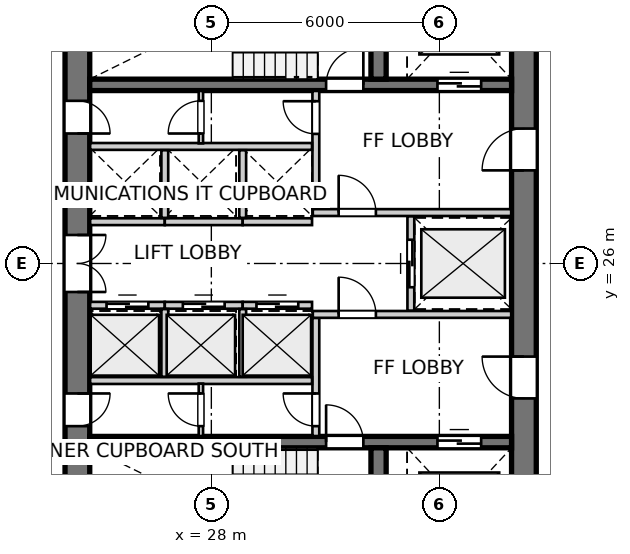
"""IFC4 building model, lengths in metres.
Left out: names, types, materials, properties, quantities, classifications, styles, units other than length and angle.
Written with IfcOpenShell. Run it as: python <this file> out.ifc"""

import sys

from ifc_helpers import new_model, si_unit, direction, frame, frame_2d, origin, place, context, subcontext, project, spatial, rectangle, extrude, source, transform, mapped, element, fill, save


model = new_model("IFC4")
c1 = context("Model", 3, precision=1e-05, world=origin(), true_north=direction((0.0, 1.0)))
c2 = subcontext(c1, "Body", "Model", "MODEL_VIEW")
j1 = project(units=[si_unit("LENGTHUNIT", "METRE"), si_unit("PLANEANGLEUNIT", "RADIAN")], contexts=[c1])
p1 = place(None, origin())
s1 = spatial("IfcSite", under=j1, at=p1, CompositionType="ELEMENT")
p2 = place(p1, origin())
s2 = spatial("IfcBuilding", under=s1, at=p2, CompositionType="ELEMENT")
p3 = place(p2, frame((0.0, 0.0, 86.4)))
s3 = spatial("IfcBuildingStorey", under=s2, at=p3, CompositionType="ELEMENT", Elevation=86.4)
p4 = place(p3, frame((24.475, 33.8, 0.0), z_axis=(0.0, 0.0, 1.0), x_axis=(0.0, -1.0, 0.0)))
e1 = element("IfcWall", 1, at=p4, inside=s3, PredefinedType="SHEAR", context=c2, shape_type="SweptSolid", body=[
    extrude(rectangle(XDim=15.6, YDim=0.65, at=frame_2d((7.8, 0.0))), origin(), (0.0, 0.0, 1.0), 2.95),
])
p5 = place(p4, frame((7.05, 0.0, 0.0)))
e2 = element("IfcOpeningElement", 2, at=p5, cuts=e1, PredefinedType="OPENING", context=c2, shape_type="SweptSolid", body=[
    extrude(rectangle(XDim=1.5, YDim=2.15, at=frame_2d((0.75, 1.075))), frame((0.0, 0.335, 0.0), z_axis=(0.0, -1.0, 0.0), x_axis=(1.0, 0.0, 0.0)), (0.0, 0.0, 1.0), 0.67),
])
p6 = place(p4, frame((3.52, 0.0, 0.0)))
e3 = element("IfcOpeningElement", 3, at=p6, cuts=e1, PredefinedType="OPENING", context=c2, shape_type="SweptSolid", body=[
    extrude(rectangle(XDim=0.86, YDim=2.05, at=frame_2d((0.43, 1.025))), frame((0.0, 0.335, 0.0), z_axis=(0.0, -1.0, 0.0), x_axis=(1.0, 0.0, 0.0)), (0.0, 0.0, 1.0), 0.67),
])
p7 = place(p4, frame((11.22, 0.0, 0.0)))
e4 = element("IfcOpeningElement", 4, at=p7, cuts=e1, PredefinedType="OPENING", context=c2, shape_type="SweptSolid", body=[
    extrude(rectangle(XDim=0.86, YDim=2.05, at=frame_2d((0.43, 1.025))), frame((0.0, 0.335, 0.0), z_axis=(0.0, -1.0, 0.0), x_axis=(1.0, 0.0, 0.0)), (0.0, 0.0, 1.0), 0.67),
])
p8 = place(p3, frame((36.225, 18.2, 0.0), z_axis=(0.0, 0.0, 1.0), x_axis=(0.0, 1.0, 0.0)))
e5 = element("IfcWall", 5, at=p8, inside=s3, PredefinedType="SHEAR", context=c2, shape_type="SweptSolid", body=[
    extrude(rectangle(XDim=15.6, YDim=0.65, at=frame_2d((7.8, 0.0))), origin(), (0.0, 0.0, 1.0), 2.95),
])
p9 = place(p8, frame((4.25, 0.0, 0.0)))
e6 = element("IfcOpeningElement", 6, at=p9, cuts=e5, PredefinedType="OPENING", context=c2, shape_type="SweptSolid", body=[
    extrude(rectangle(XDim=1.1, YDim=2.15, at=frame_2d((0.55, 1.075))), frame((0.0, 0.335, 0.0), z_axis=(0.0, -1.0, 0.0), x_axis=(1.0, 0.0, 0.0)), (0.0, 0.0, 1.0), 0.67),
])
p10 = place(p8, frame((10.25, 0.0, 0.0)))
e7 = element("IfcOpeningElement", 7, at=p10, cuts=e5, PredefinedType="OPENING", context=c2, shape_type="SweptSolid", body=[
    extrude(rectangle(XDim=1.1, YDim=2.15, at=frame_2d((0.55, 1.075))), frame((0.0, 0.335, 0.0), z_axis=(0.0, -1.0, 0.0), x_axis=(1.0, 0.0, 0.0)), (0.0, 0.0, 1.0), 0.67),
])
p11 = place(p3, frame((24.8, 21.3, 0.0), z_axis=(0.0, 0.0, 1.0), x_axis=(1.0, 0.0, 0.0)))
e8 = element("IfcWall", 8, at=p11, inside=s3, PredefinedType="SHEAR", context=c2, shape_type="SweptSolid", body=[
    extrude(rectangle(XDim=11.1, YDim=0.3, at=frame_2d((5.55, 0.0))), origin(), (0.0, 0.0, 1.0), 2.95),
])
p12 = place(p11, frame((6.22, 0.0, 0.0)))
e9 = element("IfcOpeningElement", 9, at=p12, cuts=e8, PredefinedType="OPENING", context=c2, shape_type="SweptSolid", body=[
    extrude(rectangle(XDim=0.98, YDim=2.15, at=frame_2d((0.49, 1.075))), frame((0.0, 0.16, 0.0), z_axis=(0.0, -1.0, 0.0), x_axis=(1.0, 0.0, 0.0)), (0.0, 0.0, 1.0), 0.32),
])
p13 = place(p11, frame((9.15, 0.0, 0.0)))
e10 = element("IfcOpeningElement", 10, at=p13, cuts=e8, PredefinedType="OPENING", context=c2, shape_type="SweptSolid", body=[
    extrude(rectangle(XDim=1.15, YDim=2.15, at=frame_2d((0.575, 1.075))), frame((0.0, 0.16, 0.0), z_axis=(0.0, -1.0, 0.0), x_axis=(1.0, 0.0, 0.0)), (0.0, 0.0, 1.0), 0.32),
])
p14 = place(p3, frame((32.4, 18.2, 0.0), z_axis=(0.0, 0.0, 1.0), x_axis=(0.0, 1.0, 0.0)))
e11 = element("IfcWall", 11, at=p14, inside=s3, PredefinedType="SHEAR", context=c2, shape_type="SweptSolid", body=[
    extrude(rectangle(XDim=2.95, YDim=0.4, at=frame_2d((1.475, 0.0))), origin(), (0.0, 0.0, 1.0), 2.95),
])
p15 = place(p3, frame((24.8, 30.7, 0.0), z_axis=(0.0, 0.0, 1.0), x_axis=(1.0, 0.0, 0.0)))
e12 = element("IfcWall", 12, at=p15, inside=s3, PredefinedType="SHEAR", context=c2, shape_type="SweptSolid", body=[
    extrude(rectangle(XDim=11.1, YDim=0.3, at=frame_2d((5.55, 0.0))), origin(), (0.0, 0.0, 1.0), 2.95),
])
p16 = place(p15, frame((6.22, 0.0, 0.0)))
e13 = element("IfcOpeningElement", 13, at=p16, cuts=e12, PredefinedType="OPENING", context=c2, shape_type="SweptSolid", body=[
    extrude(rectangle(XDim=0.98, YDim=2.15, at=frame_2d((0.49, 1.075))), frame((0.0, 0.16, 0.0), z_axis=(0.0, -1.0, 0.0), x_axis=(1.0, 0.0, 0.0)), (0.0, 0.0, 1.0), 0.32),
])
p17 = place(p15, frame((9.15, 0.0, 0.0)))
e14 = element("IfcOpeningElement", 14, at=p17, cuts=e12, PredefinedType="OPENING", context=c2, shape_type="SweptSolid", body=[
    extrude(rectangle(XDim=1.15, YDim=2.15, at=frame_2d((0.575, 1.075))), frame((0.0, 0.16, 0.0), z_axis=(0.0, -1.0, 0.0), x_axis=(1.0, 0.0, 0.0)), (0.0, 0.0, 1.0), 0.32),
])
p18 = place(p3, frame((32.4, 30.85, 0.0), z_axis=(0.0, 0.0, 1.0), x_axis=(0.0, 1.0, 0.0)))
e15 = element("IfcWall", 15, at=p18, inside=s3, PredefinedType="SHEAR", context=c2, shape_type="SweptSolid", body=[
    extrude(rectangle(XDim=2.95, YDim=0.4, at=frame_2d((1.475, 0.0))), origin(), (0.0, 0.0, 1.0), 2.95),
])
p19 = place(p3, frame((30.75, 21.46, 0.0), z_axis=(0.0, 0.0, 1.0), x_axis=(0.0, 1.0, 0.0)))
e16 = element("IfcWall", 16, at=p19, inside=s3, PredefinedType="PARTITIONING", context=c2, shape_type="SweptSolid", body=[
    extrude(rectangle(XDim=3.11, YDim=0.18, at=frame_2d((1.555, 0.0))), origin(), (0.0, 0.0, 1.0), 2.95),
])
p20 = place(p19, frame((0.26, 0.0, 0.0)))
e17 = element("IfcOpeningElement", 17, at=p20, cuts=e16, PredefinedType="OPENING", context=c2, shape_type="SweptSolid", body=[
    extrude(rectangle(XDim=0.86, YDim=2.05, at=frame_2d((0.43, 1.025))), frame((0.0, 0.1, 0.0), z_axis=(0.0, -1.0, 0.0), x_axis=(1.0, 0.0, 0.0)), (0.0, 0.0, 1.0), 0.2),
])
p21 = place(p3, frame((30.67, 24.66, 0.0), z_axis=(0.0, 0.0, 1.0), x_axis=(1.0, 0.0, 0.0)))
e18 = element("IfcWall", 18, at=p21, inside=s3, PredefinedType="PARTITIONING", context=c2, shape_type="SweptSolid", body=[
    extrude(rectangle(XDim=5.22, YDim=0.18, at=frame_2d((2.61, 0.0))), origin(), (0.0, 0.0, 1.0), 2.95),
])
p22 = place(p21, frame((0.68, 0.0, 0.0)))
e19 = element("IfcOpeningElement", 19, at=p22, cuts=e18, PredefinedType="OPENING", context=c2, shape_type="SweptSolid", body=[
    extrude(rectangle(XDim=0.98, YDim=2.15, at=frame_2d((0.49, 1.075))), frame((0.0, 0.1, 0.0), z_axis=(0.0, -1.0, 0.0), x_axis=(1.0, 0.0, 0.0)), (0.0, 0.0, 1.0), 0.2),
])
p23 = place(p3, frame((30.75, 27.43, 0.0), z_axis=(0.0, 0.0, 1.0), x_axis=(0.0, 1.0, 0.0)))
e20 = element("IfcWall", 20, at=p23, inside=s3, PredefinedType="PARTITIONING", context=c2, shape_type="SweptSolid", body=[
    extrude(rectangle(XDim=3.11, YDim=0.18, at=frame_2d((1.555, 0.0))), origin(), (0.0, 0.0, 1.0), 2.95),
])
p24 = place(p23, frame((1.98, 0.0, 0.0)))
e21 = element("IfcOpeningElement", 21, at=p24, cuts=e20, PredefinedType="OPENING", context=c2, shape_type="SweptSolid", body=[
    extrude(rectangle(XDim=0.86, YDim=2.05, at=frame_2d((0.43, 1.025))), frame((0.0, 0.1, 0.0), z_axis=(0.0, -1.0, 0.0), x_axis=(1.0, 0.0, 0.0)), (0.0, 0.0, 1.0), 0.2),
])
p25 = place(p3, frame((30.67, 27.34, 0.0), z_axis=(0.0, 0.0, 1.0), x_axis=(1.0, 0.0, 0.0)))
e22 = element("IfcWall", 22, at=p25, inside=s3, PredefinedType="PARTITIONING", context=c2, shape_type="SweptSolid", body=[
    extrude(rectangle(XDim=5.22, YDim=0.18, at=frame_2d((2.61, 0.0))), origin(), (0.0, 0.0, 1.0), 2.95),
])
p26 = place(p25, frame((0.68, 0.0, 0.0)))
e23 = element("IfcOpeningElement", 23, at=p26, cuts=e22, PredefinedType="OPENING", context=c2, shape_type="SweptSolid", body=[
    extrude(rectangle(XDim=0.98, YDim=2.15, at=frame_2d((0.49, 1.075))), frame((0.0, 0.1, 0.0), z_axis=(0.0, -1.0, 0.0), x_axis=(1.0, 0.0, 0.0)), (0.0, 0.0, 1.0), 0.2),
])
p27 = place(p3, frame((33.25, 24.76, 0.0), z_axis=(0.0, 0.0, 1.0), x_axis=(0.0, 1.0, 0.0)))
e24 = element("IfcWall", 24, at=p27, inside=s3, PredefinedType="PARTITIONING", context=c2, shape_type="SweptSolid", body=[
    extrude(rectangle(XDim=2.48, YDim=0.18, at=frame_2d((1.24, 0.0))), origin(), (0.0, 0.0, 1.0), 2.95),
])
p28 = place(p27, frame((0.615, 0.0, 0.0)))
e25 = element("IfcOpeningElement", 25, at=p28, cuts=e24, PredefinedType="OPENING", context=c2, shape_type="SweptSolid", body=[
    extrude(rectangle(XDim=1.25, YDim=2.15, at=frame_2d((0.625, 1.075))), frame((0.0, 0.1, 0.0), z_axis=(0.0, -1.0, 0.0), x_axis=(1.0, 0.0, 0.0)), (0.0, 0.0, 1.0), 0.2),
])
p29 = place(p3, frame((24.81, 22.92, 0.0), z_axis=(0.0, 0.0, 1.0), x_axis=(1.0, 0.0, 0.0)))
e26 = element("IfcWall", 26, at=p29, inside=s3, PredefinedType="PARTITIONING", context=c2, shape_type="SweptSolid", body=[
    extrude(rectangle(XDim=5.84, YDim=0.18, at=frame_2d((2.92, 0.0))), origin(), (0.0, 0.0, 1.0), 2.95),
])
p30 = place(p3, frame((24.81, 24.9, 0.0), z_axis=(0.0, 0.0, 1.0), x_axis=(1.0, 0.0, 0.0)))
e27 = element("IfcWall", 27, at=p30, inside=s3, PredefinedType="PARTITIONING", context=c2, shape_type="SweptSolid", body=[
    extrude(rectangle(XDim=1.965, YDim=0.18, at=frame_2d((0.982, 0.0))), origin(), (0.0, 0.0, 1.0), 2.95),
])
p31 = place(p30, frame((0.433, 0.0, 0.0)))
e28 = element("IfcOpeningElement", 28, at=p31, cuts=e27, PredefinedType="OPENING", context=c2, shape_type="SweptSolid", body=[
    extrude(rectangle(XDim=1.1, YDim=2.15, at=frame_2d((0.55, 1.075))), frame((0.0, 0.1, 0.0), z_axis=(0.0, -1.0, 0.0), x_axis=(1.0, 0.0, 0.0)), (0.0, 0.0, 1.0), 0.2),
])
p32 = place(p3, frame((26.775, 24.9, 0.0), z_axis=(0.0, 0.0, 1.0), x_axis=(1.0, 0.0, 0.0)))
e29 = element("IfcWall", 29, at=p32, inside=s3, PredefinedType="PARTITIONING", context=c2, shape_type="SweptSolid", body=[
    extrude(rectangle(XDim=2.05, YDim=0.18, at=frame_2d((1.025, 0.0))), origin(), (0.0, 0.0, 1.0), 2.95),
])
p33 = place(p32, frame((0.475, 0.0, 0.0)))
e30 = element("IfcOpeningElement", 30, at=p33, cuts=e29, PredefinedType="OPENING", context=c2, shape_type="SweptSolid", body=[
    extrude(rectangle(XDim=1.1, YDim=2.15, at=frame_2d((0.55, 1.075))), frame((0.0, 0.1, 0.0), z_axis=(0.0, -1.0, 0.0), x_axis=(1.0, 0.0, 0.0)), (0.0, 0.0, 1.0), 0.2),
])
p34 = place(p3, frame((26.775, 23.02, 0.0), z_axis=(0.0, 0.0, 1.0), x_axis=(0.0, 1.0, 0.0)))
e31 = element("IfcWall", 31, at=p34, inside=s3, PredefinedType="PARTITIONING", context=c2, shape_type="SweptSolid", body=[
    extrude(rectangle(XDim=1.78, YDim=0.18, at=frame_2d((0.89, 0.0))), origin(), (0.0, 0.0, 1.0), 2.95),
])
p35 = place(p3, frame((28.825, 24.9, 0.0), z_axis=(0.0, 0.0, 1.0), x_axis=(1.0, 0.0, 0.0)))
e32 = element("IfcWall", 32, at=p35, inside=s3, PredefinedType="PARTITIONING", context=c2, shape_type="SweptSolid", body=[
    extrude(rectangle(XDim=1.825, YDim=0.18, at=frame_2d((0.913, 0.0))), origin(), (0.0, 0.0, 1.0), 2.95),
])
p36 = place(p35, frame((0.363, 0.0, 0.0)))
e33 = element("IfcOpeningElement", 33, at=p36, cuts=e32, PredefinedType="OPENING", context=c2, shape_type="SweptSolid", body=[
    extrude(rectangle(XDim=1.1, YDim=2.15, at=frame_2d((0.55, 1.075))), frame((0.0, 0.1, 0.0), z_axis=(0.0, -1.0, 0.0), x_axis=(1.0, 0.0, 0.0)), (0.0, 0.0, 1.0), 0.2),
])
p37 = place(p3, frame((28.825, 23.02, 0.0), z_axis=(0.0, 0.0, 1.0), x_axis=(0.0, 1.0, 0.0)))
e34 = element("IfcWall", 34, at=p37, inside=s3, PredefinedType="PARTITIONING", context=c2, shape_type="SweptSolid", body=[
    extrude(rectangle(XDim=1.78, YDim=0.18, at=frame_2d((0.89, 0.0))), origin(), (0.0, 0.0, 1.0), 2.95),
])
p38 = place(p3, frame((24.81, 29.08, 0.0), z_axis=(0.0, 0.0, 1.0), x_axis=(1.0, 0.0, 0.0)))
e35 = element("IfcWall", 35, at=p38, inside=s3, PredefinedType="PARTITIONING", context=c2, shape_type="SweptSolid", body=[
    extrude(rectangle(XDim=5.84, YDim=0.18, at=frame_2d((2.92, 0.0))), origin(), (0.0, 0.0, 1.0), 2.95),
])
p39 = place(p3, frame((24.81, 27.1, 0.0), z_axis=(0.0, 0.0, 1.0), x_axis=(1.0, 0.0, 0.0)))
e36 = element("IfcWall", 36, at=p39, inside=s3, PredefinedType="PARTITIONING", context=c2, shape_type="SweptSolid", body=[
    extrude(rectangle(XDim=1.965, YDim=0.18, at=frame_2d((0.982, 0.0))), origin(), (0.0, 0.0, 1.0), 2.95),
])
p40 = place(p3, frame((26.775, 27.1, 0.0), z_axis=(0.0, 0.0, 1.0), x_axis=(1.0, 0.0, 0.0)))
e37 = element("IfcWall", 37, at=p40, inside=s3, PredefinedType="PARTITIONING", context=c2, shape_type="SweptSolid", body=[
    extrude(rectangle(XDim=2.05, YDim=0.18, at=frame_2d((1.025, 0.0))), origin(), (0.0, 0.0, 1.0), 2.95),
])
p41 = place(p3, frame((26.775, 27.2, 0.0), z_axis=(0.0, 0.0, 1.0), x_axis=(0.0, 1.0, 0.0)))
e38 = element("IfcWall", 38, at=p41, inside=s3, PredefinedType="PARTITIONING", context=c2, shape_type="SweptSolid", body=[
    extrude(rectangle(XDim=1.78, YDim=0.18, at=frame_2d((0.89, 0.0))), origin(), (0.0, 0.0, 1.0), 2.95),
])
p42 = place(p3, frame((28.825, 27.1, 0.0), z_axis=(0.0, 0.0, 1.0), x_axis=(1.0, 0.0, 0.0)))
e39 = element("IfcWall", 39, at=p42, inside=s3, PredefinedType="PARTITIONING", context=c2, shape_type="SweptSolid", body=[
    extrude(rectangle(XDim=1.825, YDim=0.18, at=frame_2d((0.913, 0.0))), origin(), (0.0, 0.0, 1.0), 2.95),
])
p43 = place(p3, frame((28.825, 27.2, 0.0), z_axis=(0.0, 0.0, 1.0), x_axis=(0.0, 1.0, 0.0)))
e40 = element("IfcWall", 40, at=p43, inside=s3, PredefinedType="PARTITIONING", context=c2, shape_type="SweptSolid", body=[
    extrude(rectangle(XDim=1.78, YDim=0.18, at=frame_2d((0.89, 0.0))), origin(), (0.0, 0.0, 1.0), 2.95),
])
p44 = place(p3, frame((27.725, 21.46, 0.0), z_axis=(0.0, 0.0, 1.0), x_axis=(0.0, 1.0, 0.0)))
e41 = element("IfcWall", 41, at=p44, inside=s3, PredefinedType="PARTITIONING", context=c2, shape_type="SweptSolid", body=[
    extrude(rectangle(XDim=1.38, YDim=0.115, at=frame_2d((0.69, 0.0))), origin(), (0.0, 0.0, 1.0), 2.95),
])
p45 = place(p44, frame((0.26, 0.0, 0.0)))
e42 = element("IfcOpeningElement", 42, at=p45, cuts=e41, PredefinedType="OPENING", context=c2, shape_type="SweptSolid", body=[
    extrude(rectangle(XDim=0.86, YDim=2.05, at=frame_2d((0.43, 1.025))), frame((0.0, 0.067, 0.0), z_axis=(0.0, -1.0, 0.0), x_axis=(1.0, 0.0, 0.0)), (0.0, 0.0, 1.0), 0.135),
])
p46 = place(p3, frame((27.725, 29.16, 0.0), z_axis=(0.0, 0.0, 1.0), x_axis=(0.0, 1.0, 0.0)))
e43 = element("IfcWall", 43, at=p46, inside=s3, PredefinedType="PARTITIONING", context=c2, shape_type="SweptSolid", body=[
    extrude(rectangle(XDim=1.38, YDim=0.115, at=frame_2d((0.69, 0.0))), origin(), (0.0, 0.0, 1.0), 2.95),
])
p47 = place(p46, frame((0.26, 0.0, 0.0)))
e44 = element("IfcOpeningElement", 44, at=p47, cuts=e43, PredefinedType="OPENING", context=c2, shape_type="SweptSolid", body=[
    extrude(rectangle(XDim=0.86, YDim=2.05, at=frame_2d((0.43, 1.025))), frame((0.0, 0.067, 0.0), z_axis=(0.0, -1.0, 0.0), x_axis=(1.0, 0.0, 0.0)), (0.0, 0.0, 1.0), 0.135),
])
m1 = source(origin(), c2, "Body", "SweptSolid", [
    extrude(rectangle(XDim=0.98, YDim=2.15, at=frame_2d((0.49, 1.075))), frame((0.0, 0.025, 0.0), z_axis=(0.0, -1.0, 0.0), x_axis=(1.0, 0.0, 0.0)), (0.0, 0.0, 1.0), 0.05),
])
p48 = place(p12, origin())
e45 = element("IfcDoor", 45, at=p48, inside=s3, OperationType="SINGLE_SWING_LEFT", PredefinedType="DOOR", context=c2, shape_type="MappedRepresentation", body=[
    mapped(m1, transform((0.0, 0.0, 0.0), x_axis=(1.0, 0.0, 0.0), y_axis=(0.0, 1.0, 0.0), z_axis=(0.0, 0.0, 1.0), scale=1.0)),
])
fill(e9, e45)
m2 = source(origin(), c2, "Body", "SweptSolid", [
    extrude(rectangle(XDim=1.15, YDim=2.15, at=frame_2d((0.575, 1.075))), frame((0.0, 0.025, 0.0), z_axis=(0.0, -1.0, 0.0), x_axis=(1.0, 0.0, 0.0)), (0.0, 0.0, 1.0), 0.05),
])
p49 = place(p13, origin())
e46 = element("IfcDoor", 46, at=p49, inside=s3, OperationType="DOUBLE_DOOR_SLIDING", PredefinedType="DOOR", context=c2, shape_type="MappedRepresentation", body=[
    mapped(m2, transform((0.0, 0.0, 0.0), x_axis=(1.0, 0.0, 0.0), y_axis=(0.0, 1.0, 0.0), z_axis=(0.0, 0.0, 1.0), scale=1.0)),
])
fill(e10, e46)
p50 = place(p16, origin())
e47 = element("IfcDoor", 47, at=p50, inside=s3, OperationType="SINGLE_SWING_RIGHT", PredefinedType="DOOR", context=c2, shape_type="MappedRepresentation", body=[
    mapped(m1, transform((0.0, 0.0, 0.0), x_axis=(1.0, 0.0, 0.0), y_axis=(0.0, 1.0, 0.0), z_axis=(0.0, 0.0, 1.0), scale=1.0)),
])
fill(e13, e47)
p51 = place(p17, origin())
e48 = element("IfcDoor", 48, at=p51, inside=s3, OperationType="DOUBLE_DOOR_SLIDING", PredefinedType="DOOR", context=c2, shape_type="MappedRepresentation", body=[
    mapped(m2, transform((0.0, 0.0, 0.0), x_axis=(1.0, 0.0, 0.0), y_axis=(0.0, 1.0, 0.0), z_axis=(0.0, 0.0, 1.0), scale=1.0)),
])
fill(e14, e48)
m3 = source(origin(), c2, "Body", "SweptSolid", [
    extrude(rectangle(XDim=1.1, YDim=2.15, at=frame_2d((0.55, 1.075))), frame((0.0, 0.025, 0.0), z_axis=(0.0, -1.0, 0.0), x_axis=(1.0, 0.0, 0.0)), (0.0, 0.0, 1.0), 0.05),
])
p52 = place(p9, origin())
e49 = element("IfcDoor", 49, at=p52, inside=s3, OperationType="SINGLE_SWING_RIGHT", PredefinedType="DOOR", context=c2, shape_type="MappedRepresentation", body=[
    mapped(m3, transform((0.0, 0.0, 0.0), x_axis=(1.0, 0.0, 0.0), y_axis=(0.0, 1.0, 0.0), z_axis=(0.0, 0.0, 1.0), scale=1.0)),
])
fill(e6, e49)
p53 = place(p10, origin())
e50 = element("IfcDoor", 50, at=p53, inside=s3, OperationType="SINGLE_SWING_LEFT", PredefinedType="DOOR", context=c2, shape_type="MappedRepresentation", body=[
    mapped(m3, transform((0.0, 0.0, 0.0), x_axis=(1.0, 0.0, 0.0), y_axis=(0.0, 1.0, 0.0), z_axis=(0.0, 0.0, 1.0), scale=1.0)),
])
fill(e7, e50)
m4 = source(origin(), c2, "Body", "SweptSolid", [
    extrude(rectangle(XDim=1.5, YDim=2.15, at=frame_2d((0.75, 1.075))), frame((0.0, 0.025, 0.0), z_axis=(0.0, -1.0, 0.0), x_axis=(1.0, 0.0, 0.0)), (0.0, 0.0, 1.0), 0.05),
])
p54 = place(p5, origin())
e51 = element("IfcDoor", 51, at=p54, inside=s3, OperationType="DOUBLE_DOOR_SINGLE_SWING", PredefinedType="DOOR", context=c2, shape_type="MappedRepresentation", body=[
    mapped(m4, transform((0.0, 0.0, 0.0), x_axis=(1.0, 0.0, 0.0), y_axis=(0.0, 1.0, 0.0), z_axis=(0.0, 0.0, 1.0), scale=1.0)),
])
fill(e2, e51)
m5 = source(origin(), c2, "Body", "SweptSolid", [
    extrude(rectangle(XDim=0.86, YDim=2.05, at=frame_2d((0.43, 1.025))), frame((0.0, 0.025, 0.0), z_axis=(0.0, -1.0, 0.0), x_axis=(1.0, 0.0, 0.0)), (0.0, 0.0, 1.0), 0.05),
])
p55 = place(p6, origin())
e52 = element("IfcDoor", 52, at=p55, inside=s3, OperationType="SINGLE_SWING_RIGHT", PredefinedType="DOOR", context=c2, shape_type="MappedRepresentation", body=[
    mapped(m5, transform((0.0, 0.0, 0.0), x_axis=(1.0, 0.0, 0.0), y_axis=(0.0, 1.0, 0.0), z_axis=(0.0, 0.0, 1.0), scale=1.0)),
])
fill(e3, e52)
p56 = place(p7, origin())
e53 = element("IfcDoor", 53, at=p56, inside=s3, OperationType="SINGLE_SWING_LEFT", PredefinedType="DOOR", context=c2, shape_type="MappedRepresentation", body=[
    mapped(m5, transform((0.0, 0.0, 0.0), x_axis=(1.0, 0.0, 0.0), y_axis=(0.0, 1.0, 0.0), z_axis=(0.0, 0.0, 1.0), scale=1.0)),
])
fill(e4, e53)
p57 = place(p20, origin())
e54 = element("IfcDoor", 54, at=p57, inside=s3, OperationType="SINGLE_SWING_RIGHT", PredefinedType="DOOR", context=c2, shape_type="MappedRepresentation", body=[
    mapped(m5, transform((0.0, 0.0, 0.0), x_axis=(1.0, 0.0, 0.0), y_axis=(0.0, 1.0, 0.0), z_axis=(0.0, 0.0, 1.0), scale=1.0)),
])
fill(e17, e54)
p58 = place(p22, origin())
e55 = element("IfcDoor", 55, at=p58, inside=s3, OperationType="SINGLE_SWING_LEFT", PredefinedType="DOOR", context=c2, shape_type="MappedRepresentation", body=[
    mapped(m1, transform((0.0, 0.0, 0.0), x_axis=(1.0, 0.0, 0.0), y_axis=(0.0, 1.0, 0.0), z_axis=(0.0, 0.0, 1.0), scale=1.0)),
])
fill(e19, e55)
p59 = place(p24, origin())
e56 = element("IfcDoor", 56, at=p59, inside=s3, OperationType="SINGLE_SWING_RIGHT", PredefinedType="DOOR", context=c2, shape_type="MappedRepresentation", body=[
    mapped(m5, transform((0.0, 0.0, 0.0), x_axis=(1.0, 0.0, 0.0), y_axis=(0.0, 1.0, 0.0), z_axis=(0.0, 0.0, 1.0), scale=1.0)),
])
fill(e21, e56)
p60 = place(p26, origin())
e57 = element("IfcDoor", 57, at=p60, inside=s3, OperationType="SINGLE_SWING_LEFT", PredefinedType="DOOR", context=c2, shape_type="MappedRepresentation", body=[
    mapped(m1, transform((0.0, 0.0, 0.0), x_axis=(1.0, 0.0, 0.0), y_axis=(0.0, 1.0, 0.0), z_axis=(0.0, 0.0, 1.0), scale=1.0)),
])
fill(e23, e57)
m6 = source(origin(), c2, "Body", "SweptSolid", [
    extrude(rectangle(XDim=1.25, YDim=2.15, at=frame_2d((0.625, 1.075))), frame((0.0, 0.025, 0.0), z_axis=(0.0, -1.0, 0.0), x_axis=(1.0, 0.0, 0.0)), (0.0, 0.0, 1.0), 0.05),
])
p61 = place(p28, origin())
e58 = element("IfcDoor", 58, at=p61, inside=s3, OperationType="DOUBLE_DOOR_SLIDING", PredefinedType="DOOR", context=c2, shape_type="MappedRepresentation", body=[
    mapped(m6, transform((0.0, 0.0, 0.0), x_axis=(1.0, 0.0, 0.0), y_axis=(0.0, 1.0, 0.0), z_axis=(0.0, 0.0, 1.0), scale=1.0)),
])
fill(e25, e58)
p62 = place(p31, origin())
e59 = element("IfcDoor", 59, at=p62, inside=s3, OperationType="DOUBLE_DOOR_SLIDING", PredefinedType="DOOR", context=c2, shape_type="MappedRepresentation", body=[
    mapped(m3, transform((0.0, 0.0, 0.0), x_axis=(1.0, 0.0, 0.0), y_axis=(0.0, 1.0, 0.0), z_axis=(0.0, 0.0, 1.0), scale=1.0)),
])
fill(e28, e59)
p63 = place(p33, origin())
e60 = element("IfcDoor", 60, at=p63, inside=s3, OperationType="DOUBLE_DOOR_SLIDING", PredefinedType="DOOR", context=c2, shape_type="MappedRepresentation", body=[
    mapped(m3, transform((0.0, 0.0, 0.0), x_axis=(1.0, 0.0, 0.0), y_axis=(0.0, 1.0, 0.0), z_axis=(0.0, 0.0, 1.0), scale=1.0)),
])
fill(e30, e60)
p64 = place(p36, origin())
e61 = element("IfcDoor", 61, at=p64, inside=s3, OperationType="DOUBLE_DOOR_SLIDING", PredefinedType="DOOR", context=c2, shape_type="MappedRepresentation", body=[
    mapped(m3, transform((0.0, 0.0, 0.0), x_axis=(1.0, 0.0, 0.0), y_axis=(0.0, 1.0, 0.0), z_axis=(0.0, 0.0, 1.0), scale=1.0)),
])
fill(e33, e61)
p65 = place(p45, origin())
e62 = element("IfcDoor", 62, at=p65, inside=s3, OperationType="SINGLE_SWING_RIGHT", PredefinedType="DOOR", context=c2, shape_type="MappedRepresentation", body=[
    mapped(m5, transform((0.0, 0.0, 0.0), x_axis=(1.0, 0.0, 0.0), y_axis=(0.0, 1.0, 0.0), z_axis=(0.0, 0.0, 1.0), scale=1.0)),
])
fill(e42, e62)
p66 = place(p47, origin())
e63 = element("IfcDoor", 63, at=p66, inside=s3, OperationType="SINGLE_SWING_LEFT", PredefinedType="DOOR", context=c2, shape_type="MappedRepresentation", body=[
    mapped(m5, transform((0.0, 0.0, 0.0), x_axis=(1.0, 0.0, 0.0), y_axis=(0.0, 1.0, 0.0), z_axis=(0.0, 0.0, 1.0), scale=1.0)),
])
fill(e44, e63)
save(model, sys.argv[1])
